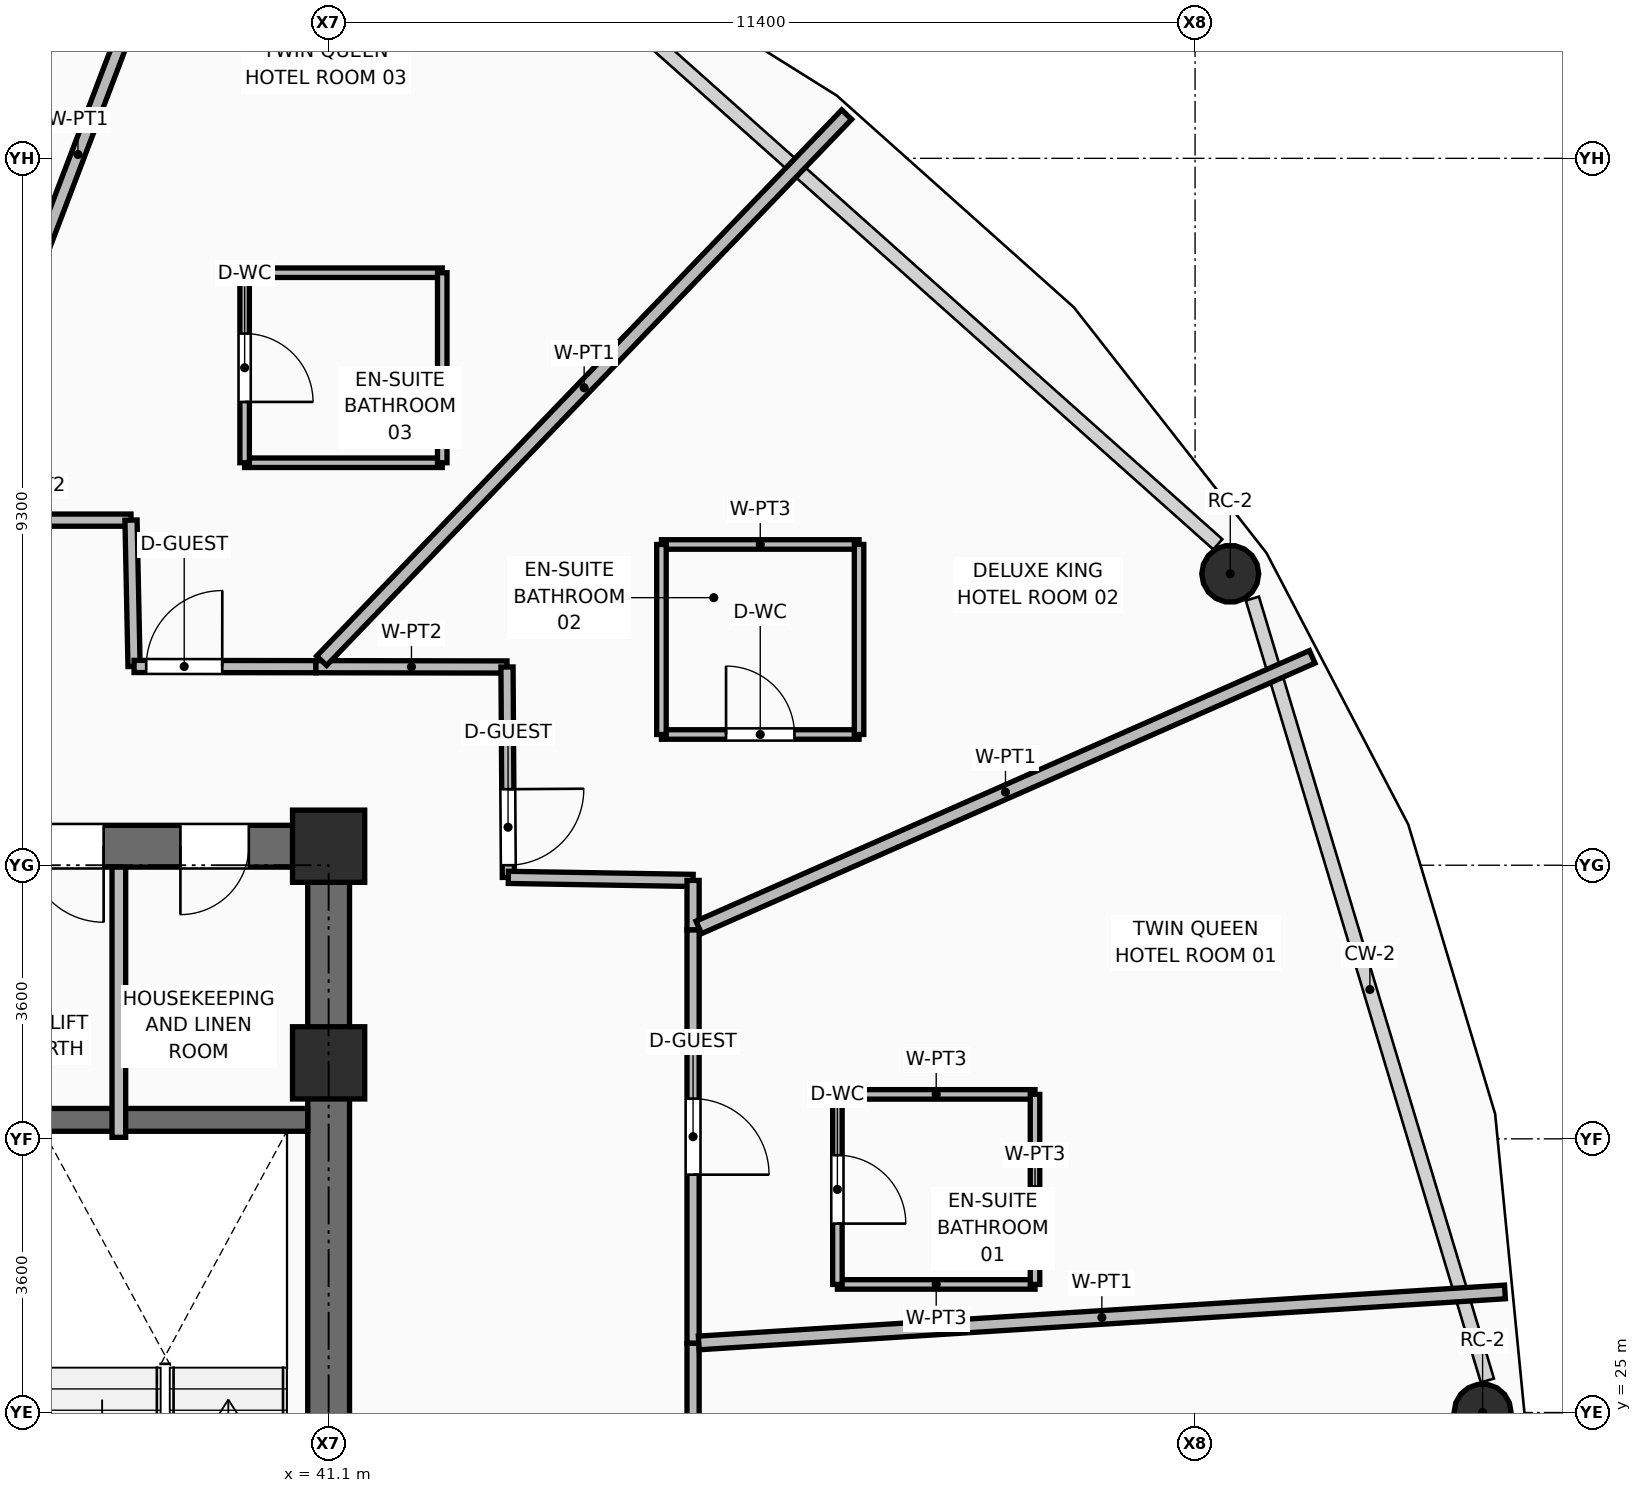
"""IFC4 building model, lengths in metres.
Left out: names, types, materials, properties, quantities, classifications, styles, units other than length and angle.
Written with IfcOpenShell. Run it as: python <this file> out.ifc"""

import sys

from ifc_helpers import new_model, si_unit, direction, frame, frame_2d, origin, origin_2d, place, context, subcontext, project, spatial, rectangle, hollow_circle, extrude, element, fill, save


model = new_model("IFC4")
c1 = context("Model", 3, precision=1e-05, world=origin(), true_north=direction((0.0, 1.0)))
c2 = subcontext(c1, "Body", "Model", "MODEL_VIEW")
j1 = project(units=[si_unit("LENGTHUNIT", "METRE"), si_unit("PLANEANGLEUNIT", "RADIAN")], contexts=[c1])
p1 = place(None, origin())
s1 = spatial("IfcSite", under=j1, at=p1, CompositionType="ELEMENT")
p2 = place(p1, origin())
s2 = spatial("IfcBuilding", under=s1, at=p2, CompositionType="ELEMENT")
p3 = place(p2, frame((0.0, 0.0, 153.45)))
s3 = spatial("IfcBuildingStorey", under=s2, at=p3, CompositionType="ELEMENT", Elevation=153.45)
for number, where, z_axis, x_axis in (
    (1, (41.1, 29.6, 0.0), (0.0, 0.0, 1.0), (1.0, 0.0, 0.0)),
    (2, (41.1, 32.45, 0.0), (0.0, 0.0, 1.0), (1.0, 0.0, 0.0)),
):
    element("IfcColumn", number, at=place(p3, frame(where, z_axis=z_axis, x_axis=x_axis)), inside=s3, PredefinedType="COLUMN", context=c2, shape_type="SweptSolid", body=[
        extrude(rectangle(XDim=0.95, YDim=0.95, at=origin_2d()), origin(), (0.0, 0.0, 1.0), 3.75),
    ])
for number, where, z_axis, x_axis in (
    (3, (56.283, 25.0, 0.0), (0.0, 0.0, 1.0), (1.0, 0.0, 0.0)),
    (4, (52.963, 36.034, 0.0), (0.0, 0.0, 1.0), (1.0, 0.0, 0.0)),
):
    element("IfcColumn", number, at=place(p3, frame(where, z_axis=z_axis, x_axis=x_axis)), inside=s3, PredefinedType="COLUMN", context=c2, shape_type="SweptSolid", body=[
        extrude(hollow_circle(Radius=0.375, WallThickness=0.035, at=origin_2d()), origin(), (0.0, 0.0, 1.0), 3.57),
    ])
p4 = place(p3, frame((21.625, 32.45, 0.0), z_axis=(0.0, 0.0, 1.0), x_axis=(1.0, 0.0, 0.0)))
e5 = element("IfcWall", 5, at=p4, inside=s3, PredefinedType="SHEAR", context=c2, shape_type="SweptSolid", body=[
    extrude(rectangle(XDim=19.75, YDim=0.55, at=frame_2d((9.875, 0.0))), origin(), (0.0, 0.0, 1.0), 3.57),
])
p5 = place(p4, frame((2.125, 0.0, 0.0)))
e6 = element("IfcOpeningElement", 6, at=p5, cuts=e5, PredefinedType="OPENING", context=c2, shape_type="SweptSolid", body=[
    extrude(rectangle(XDim=1.1, YDim=2.1, at=frame_2d((0.55, 1.05))), frame((0.0, 0.285, 0.0), z_axis=(0.0, -1.0, 0.0), x_axis=(1.0, 0.0, 0.0)), (0.0, 0.0, 1.0), 0.57),
])
p6 = place(p4, frame((15.515, 0.0, 0.0)))
e7 = element("IfcOpeningElement", 7, at=p6, cuts=e5, PredefinedType="OPENING", context=c2, shape_type="SweptSolid", body=[
    extrude(rectangle(XDim=1.0, YDim=2.1, at=frame_2d((0.5, 1.05))), frame((0.0, 0.285, 0.0), z_axis=(0.0, -1.0, 0.0), x_axis=(1.0, 0.0, 0.0)), (0.0, 0.0, 1.0), 0.57),
])
p7 = place(p4, frame((17.525, 0.0, 0.0)))
e8 = element("IfcOpeningElement", 8, at=p7, cuts=e5, PredefinedType="OPENING", context=c2, shape_type="SweptSolid", body=[
    extrude(rectangle(XDim=0.9, YDim=2.1, at=frame_2d((0.45, 1.05))), frame((0.0, 0.285, 0.0), z_axis=(0.0, -1.0, 0.0), x_axis=(1.0, 0.0, 0.0)), (0.0, 0.0, 1.0), 0.57),
])
p8 = place(p3, frame((41.1, 18.075, 0.0), z_axis=(0.0, 0.0, 1.0), x_axis=(0.0, 1.0, 0.0)))
e9 = element("IfcWall", 9, at=p8, inside=s3, PredefinedType="SHEAR", context=c2, shape_type="SweptSolid", body=[
    extrude(rectangle(XDim=14.1, YDim=0.55, at=frame_2d((7.05, 0.0))), origin(), (0.0, 0.0, 1.0), 3.57),
])
p9 = place(p8, frame((3.385, 0.0, 0.0)))
e10 = element("IfcOpeningElement", 10, at=p9, cuts=e9, PredefinedType="OPENING", context=c2, shape_type="SweptSolid", body=[
    extrude(rectangle(XDim=1.05, YDim=2.1, at=frame_2d((0.525, 1.05))), frame((0.0, 0.285, 0.0), z_axis=(0.0, -1.0, 0.0), x_axis=(1.0, 0.0, 0.0)), (0.0, 0.0, 1.0), 0.57),
])
p10 = place(p3, frame((37.21, 28.85, 0.0), z_axis=(0.0, 0.0, 1.0), x_axis=(1.0, 0.0, 0.0)))
e11 = element("IfcWall", 11, at=p10, inside=s3, PredefinedType="SHEAR", context=c2, shape_type="SweptSolid", body=[
    extrude(rectangle(XDim=3.615, YDim=0.3, at=frame_2d((1.808, 0.0))), origin(), (0.0, 0.0, 1.0), 3.57),
])
p11 = place(p3, frame((38.34, 28.62, 0.0), z_axis=(0.0, 0.0, 1.0), x_axis=(0.0, 1.0, 0.0)))
e12 = element("IfcWall", 12, at=p11, inside=s3, PredefinedType="PARTITIONING", context=c2, shape_type="SweptSolid", body=[
    extrude(rectangle(XDim=3.555, YDim=0.18, at=frame_2d((1.777, 0.0))), origin(), (0.0, 0.0, 1.0), 3.55),
])
p12 = place(p3, frame((35.971, 36.74, 0.0), z_axis=(0.0, 0.0, 1.0), x_axis=(1.0, 0.0, 0.0)))
e13 = element("IfcWall", 13, at=p12, inside=s3, PredefinedType="PARTITIONING", context=c2, shape_type="SweptSolid", body=[
    extrude(rectangle(XDim=2.529, YDim=0.16, at=frame_2d((1.265, 0.0))), origin(), (0.0, 0.0, 1.0), 3.55),
])
p13 = place(p3, frame((38.5, 36.74, 0.0), z_axis=(0.0, 0.0, 1.0), x_axis=(0.020794488077, -0.999783771255, 0.0)))
e14 = element("IfcWall", 14, at=p13, inside=s3, PredefinedType="PARTITIONING", context=c2, shape_type="SweptSolid", body=[
    extrude(rectangle(XDim=1.926, YDim=0.16, at=frame_2d((0.963, 0.0))), origin(), (0.0, 0.0, 1.0), 3.55),
])
p14 = place(p3, frame((38.54, 34.815, 0.0), z_axis=(0.0, 0.0, 1.0), x_axis=(0.999999250619, -0.001224239034, 0.0)))
e15 = element("IfcWall", 15, at=p14, inside=s3, PredefinedType="PARTITIONING", context=c2, shape_type="SweptSolid", body=[
    extrude(rectangle(XDim=2.393, YDim=0.16, at=frame_2d((1.197, 0.0))), origin(), (0.0, 0.0, 1.0), 3.55),
])
p15 = place(p14, frame((0.16, 0.0, 0.0)))
e16 = element("IfcOpeningElement", 16, at=p15, cuts=e15, PredefinedType="OPENING", context=c2, shape_type="SweptSolid", body=[
    extrude(rectangle(XDim=1.0, YDim=2.1, at=frame_2d((0.5, 1.05))), frame((0.0, 0.09, 0.0), z_axis=(0.0, -1.0, 0.0), x_axis=(1.0, 0.0, 0.0)), (0.0, 0.0, 1.0), 0.18),
])
p16 = place(p3, frame((40.933, 34.812, 0.0), z_axis=(0.0, 0.0, 1.0), x_axis=(0.999998792776, -0.00155384876, 0.0)))
e17 = element("IfcWall", 17, at=p16, inside=s3, PredefinedType="PARTITIONING", context=c2, shape_type="SweptSolid", body=[
    extrude(rectangle(XDim=2.514, YDim=0.16, at=frame_2d((1.257, 0.0))), origin(), (0.0, 0.0, 1.0), 3.006),
])
p17 = place(p3, frame((43.447, 34.808, 0.0), z_axis=(0.0, 0.0, 1.0), x_axis=(0.006526585281, -0.999978701615, 0.0)))
e18 = element("IfcWall", 18, at=p17, inside=s3, PredefinedType="PARTITIONING", context=c2, shape_type="SweptSolid", body=[
    extrude(rectangle(XDim=2.768, YDim=0.16, at=frame_2d((1.384, 0.0))), origin(), (0.0, 0.0, 1.0), 3.006),
])
p18 = place(p17, frame((1.608, 0.0, 0.0)))
e19 = element("IfcOpeningElement", 19, at=p18, cuts=e18, PredefinedType="OPENING", context=c2, shape_type="SweptSolid", body=[
    extrude(rectangle(XDim=1.0, YDim=2.1, at=frame_2d((0.5, 1.05))), frame((0.0, 0.09, 0.0), z_axis=(0.0, -1.0, 0.0), x_axis=(1.0, 0.0, 0.0)), (0.0, 0.0, 1.0), 0.18),
])
p19 = place(p3, frame((43.465, 32.04, 0.0), z_axis=(0.0, 0.0, 1.0), x_axis=(0.999864274557, -0.016475207578, 0.0)))
e20 = element("IfcWall", 20, at=p19, inside=s3, PredefinedType="PARTITIONING", context=c2, shape_type="SweptSolid", body=[
    extrude(rectangle(XDim=2.43, YDim=0.16, at=frame_2d((1.215, 0.0))), origin(), (0.0, 0.0, 1.0), 3.55),
])
p20 = place(p3, frame((45.895, 32.0, 0.0), z_axis=(0.0, 0.0, 1.0), x_axis=(0.0, -1.0, 0.0)))
e21 = element("IfcWall", 21, at=p20, inside=s3, PredefinedType="PARTITIONING", context=c2, shape_type="SweptSolid", body=[
    extrude(rectangle(XDim=0.652, YDim=0.16, at=frame_2d((0.326, 0.0))), origin(), (0.0, 0.0, 1.0), 3.55),
])
p21 = place(p3, frame((45.895, 31.348, 0.0), z_axis=(0.0, 0.0, 1.0), x_axis=(0.0, -1.0, 0.0)))
e22 = element("IfcWall", 22, at=p21, inside=s3, PredefinedType="PARTITIONING", context=c2, shape_type="SweptSolid", body=[
    extrude(rectangle(XDim=5.438, YDim=0.16, at=frame_2d((2.719, 0.0))), origin(), (0.0, 0.0, 1.0), 3.55),
])
p22 = place(p21, frame((2.219, 0.0, 0.0)))
e23 = element("IfcOpeningElement", 23, at=p22, cuts=e22, PredefinedType="OPENING", context=c2, shape_type="SweptSolid", body=[
    extrude(rectangle(XDim=1.0, YDim=2.1, at=frame_2d((0.5, 1.05))), frame((0.0, 0.09, 0.0), z_axis=(0.0, -1.0, 0.0), x_axis=(1.0, 0.0, 0.0)), (0.0, 0.0, 1.0), 0.18),
])
p23 = place(p3, frame((45.895, 25.91, 0.0), z_axis=(0.0, 0.0, 1.0), x_axis=(0.0, -1.0, 0.0)))
e24 = element("IfcWall", 24, at=p23, inside=s3, PredefinedType="PARTITIONING", context=c2, shape_type="SweptSolid", body=[
    extrude(rectangle(XDim=5.139, YDim=0.16, at=frame_2d((2.569, 0.0))), origin(), (0.0, 0.0, 1.0), 3.006),
])
p24 = place(p23, frame((2.069, 0.0, 0.0)))
e25 = element("IfcOpeningElement", 25, at=p24, cuts=e24, PredefinedType="OPENING", context=c2, shape_type="SweptSolid", body=[
    extrude(rectangle(XDim=1.0, YDim=2.1, at=frame_2d((0.5, 1.05))), frame((0.0, 0.09, 0.0), z_axis=(0.0, -1.0, 0.0), x_axis=(1.0, 0.0, 0.0)), (0.0, 0.0, 1.0), 0.18),
])
p25 = place(p3, frame((45.97, 25.915, 0.0), z_axis=(0.0, 0.0, 1.0), x_axis=(0.998005641889, 0.063124787182, 0.0)))
e26 = element("IfcWall", 26, at=p25, inside=s3, PredefinedType="PARTITIONING", context=c2, shape_type="SweptSolid", body=[
    extrude(rectangle(XDim=10.628, YDim=0.18, at=frame_2d((5.314, 0.0))), origin(), (0.0, 0.0, 1.0), 2.852),
])
p26 = place(p3, frame((45.97, 31.382, 0.0), z_axis=(0.0, 0.0, 1.0), x_axis=(0.914998050902, 0.403458259112, 0.0)))
e27 = element("IfcWall", 27, at=p26, inside=s3, PredefinedType="PARTITIONING", context=c2, shape_type="SweptSolid", body=[
    extrude(rectangle(XDim=8.821, YDim=0.18, at=frame_2d((4.41, 0.0))), origin(), (0.0, 0.0, 1.0), 2.852),
])
p27 = place(p3, frame((41.008, 34.89, 0.0), z_axis=(0.0, 0.0, 1.0), x_axis=(0.693069554284, 0.720870718593, 0.0)))
e28 = element("IfcWall", 28, at=p27, inside=s3, PredefinedType="PARTITIONING", context=c2, shape_type="SweptSolid", body=[
    extrude(rectangle(XDim=9.967, YDim=0.18, at=frame_2d((4.984, 0.0))), origin(), (0.0, 0.0, 1.0), 2.852),
])
p28 = place(p3, frame((35.999, 36.815, 0.0), z_axis=(0.0, 0.0, 1.0), x_axis=(0.355905167446, 0.934522076671, 0.0)))
e29 = element("IfcWall", 29, at=p28, inside=s3, PredefinedType="PARTITIONING", context=c2, shape_type="SweptSolid", body=[
    extrude(rectangle(XDim=10.135, YDim=0.18, at=frame_2d((5.067, 0.0))), origin(), (0.0, 0.0, 1.0), 2.852),
])
for number, where, z_axis, x_axis in (
    (30, (47.794, 26.685, 0.0), (0.0, 0.0, 1.0), (1.0, 0.0, 0.0)),
    (31, (47.794, 29.185, 0.0), (0.0, 0.0, 1.0), (1.0, 0.0, 0.0)),
):
    element("IfcWall", number, at=place(p3, frame(where, z_axis=z_axis, x_axis=x_axis)), inside=s3, PredefinedType="PARTITIONING", context=c2, shape_type="SweptSolid", body=[
        extrude(rectangle(XDim=2.6, YDim=0.125, at=frame_2d((1.3, 0.0))), origin(), (0.0, 0.0, 1.0), 3.55),
    ])
p29 = place(p3, frame((47.794, 26.685, 0.0), z_axis=(0.0, 0.0, 1.0), x_axis=(0.0, 1.0, 0.0)))
e32 = element("IfcWall", 32, at=p29, inside=s3, PredefinedType="PARTITIONING", context=c2, shape_type="SweptSolid", body=[
    extrude(rectangle(XDim=2.5, YDim=0.125, at=frame_2d((1.25, 0.0))), origin(), (0.0, 0.0, 1.0), 3.55),
])
p30 = place(p29, frame((0.8, 0.0, 0.0)))
e33 = element("IfcOpeningElement", 33, at=p30, cuts=e32, PredefinedType="OPENING", context=c2, shape_type="SweptSolid", body=[
    extrude(rectangle(XDim=0.9, YDim=2.1, at=frame_2d((0.45, 1.05))), frame((0.0, 0.073, 0.0), z_axis=(0.0, -1.0, 0.0), x_axis=(1.0, 0.0, 0.0)), (0.0, 0.0, 1.0), 0.145),
])
p31 = place(p3, frame((50.394, 26.685, 0.0), z_axis=(0.0, 0.0, 1.0), x_axis=(0.0, 1.0, 0.0)))
e34 = element("IfcWall", 34, at=p31, inside=s3, PredefinedType="PARTITIONING", context=c2, shape_type="SweptSolid", body=[
    extrude(rectangle(XDim=2.5, YDim=0.125, at=frame_2d((1.25, 0.0))), origin(), (0.0, 0.0, 1.0), 3.55),
])
p32 = place(p3, frame((45.479, 33.92, 0.0), z_axis=(0.0, 0.0, 1.0), x_axis=(1.0, 0.0, 0.0)))
e35 = element("IfcWall", 35, at=p32, inside=s3, PredefinedType="PARTITIONING", context=c2, shape_type="SweptSolid", body=[
    extrude(rectangle(XDim=2.6, YDim=0.125, at=frame_2d((1.3, 0.0))), origin(), (0.0, 0.0, 1.0), 3.006),
])
p33 = place(p32, frame((0.85, 0.0, 0.0)))
e36 = element("IfcOpeningElement", 36, at=p33, cuts=e35, PredefinedType="OPENING", context=c2, shape_type="SweptSolid", body=[
    extrude(rectangle(XDim=0.9, YDim=2.1, at=frame_2d((0.45, 1.05))), frame((0.0, 0.073, 0.0), z_axis=(0.0, -1.0, 0.0), x_axis=(1.0, 0.0, 0.0)), (0.0, 0.0, 1.0), 0.145),
])
p34 = place(p3, frame((45.479, 36.42, 0.0), z_axis=(0.0, 0.0, 1.0), x_axis=(1.0, 0.0, 0.0)))
e37 = element("IfcWall", 37, at=p34, inside=s3, PredefinedType="PARTITIONING", context=c2, shape_type="SweptSolid", body=[
    extrude(rectangle(XDim=2.6, YDim=0.125, at=frame_2d((1.3, 0.0))), origin(), (0.0, 0.0, 1.0), 3.55),
])
for number, where, z_axis, x_axis in (
    (38, (45.479, 33.92, 0.0), (0.0, 0.0, 1.0), (0.0, 1.0, 0.0)),
    (39, (48.079, 33.92, 0.0), (0.0, 0.0, 1.0), (0.0, 1.0, 0.0)),
):
    element("IfcWall", number, at=place(p3, frame(where, z_axis=z_axis, x_axis=x_axis)), inside=s3, PredefinedType="PARTITIONING", context=c2, shape_type="SweptSolid", body=[
        extrude(rectangle(XDim=2.5, YDim=0.125, at=frame_2d((1.25, 0.0))), origin(), (0.0, 0.0, 1.0), 3.006),
    ])
p35 = place(p3, frame((39.995, 37.495, 0.0), z_axis=(0.0, 0.0, 1.0), x_axis=(1.0, 0.0, 0.0)))
e40 = element("IfcWall", 40, at=p35, inside=s3, PredefinedType="PARTITIONING", context=c2, shape_type="SweptSolid", body=[
    extrude(rectangle(XDim=2.6, YDim=0.125, at=frame_2d((1.3, 0.0))), origin(), (0.0, 0.0, 1.0), 3.006),
])
p36 = place(p3, frame((39.995, 39.995, 0.0), z_axis=(0.0, 0.0, 1.0), x_axis=(1.0, 0.0, 0.0)))
e41 = element("IfcWall", 41, at=p36, inside=s3, PredefinedType="PARTITIONING", context=c2, shape_type="SweptSolid", body=[
    extrude(rectangle(XDim=2.6, YDim=0.125, at=frame_2d((1.3, 0.0))), origin(), (0.0, 0.0, 1.0), 3.55),
])
p37 = place(p3, frame((39.995, 37.495, 0.0), z_axis=(0.0, 0.0, 1.0), x_axis=(0.0, 1.0, 0.0)))
e42 = element("IfcWall", 42, at=p37, inside=s3, PredefinedType="PARTITIONING", context=c2, shape_type="SweptSolid", body=[
    extrude(rectangle(XDim=2.5, YDim=0.125, at=frame_2d((1.25, 0.0))), origin(), (0.0, 0.0, 1.0), 3.55),
])
p38 = place(p37, frame((0.8, 0.0, 0.0)))
e43 = element("IfcOpeningElement", 43, at=p38, cuts=e42, PredefinedType="OPENING", context=c2, shape_type="SweptSolid", body=[
    extrude(rectangle(XDim=0.9, YDim=2.1, at=frame_2d((0.45, 1.05))), frame((0.0, 0.073, 0.0), z_axis=(0.0, -1.0, 0.0), x_axis=(1.0, 0.0, 0.0)), (0.0, 0.0, 1.0), 0.145),
])
p39 = place(p3, frame((42.595, 37.495, 0.0), z_axis=(0.0, 0.0, 1.0), x_axis=(0.0, 1.0, 0.0)))
e44 = element("IfcWall", 44, at=p39, inside=s3, PredefinedType="PARTITIONING", context=c2, shape_type="SweptSolid", body=[
    extrude(rectangle(XDim=2.5, YDim=0.125, at=frame_2d((1.25, 0.0))), origin(), (0.0, 0.0, 1.0), 3.006),
])
p40 = place(p6, frame((1.0, 0.0, 0.0), z_axis=(0.0, 0.0, 1.0), x_axis=(-1.0, 0.0, 0.0)))
e45 = element("IfcDoor", 45, at=p40, inside=s3, OperationType="SINGLE_SWING_LEFT", PredefinedType="DOOR", context=c2, shape_type="SweptSolid", body=[
    extrude(rectangle(XDim=1.0, YDim=2.1, at=frame_2d((0.5, 1.05))), frame((0.0, 0.025, 0.0), z_axis=(0.0, -1.0, 0.0), x_axis=(1.0, 0.0, 0.0)), (0.0, 0.0, 1.0), 0.05),
])
fill(e7, e45)
p41 = place(p7, frame((0.9, 0.0, 0.0), z_axis=(0.0, 0.0, 1.0), x_axis=(-1.0, 0.0, 0.0)))
e46 = element("IfcDoor", 46, at=p41, inside=s3, OperationType="SINGLE_SWING_RIGHT", PredefinedType="DOOR", context=c2, shape_type="SweptSolid", body=[
    extrude(rectangle(XDim=0.9, YDim=2.1, at=frame_2d((0.45, 1.05))), frame((0.0, 0.025, 0.0), z_axis=(0.0, -1.0, 0.0), x_axis=(1.0, 0.0, 0.0)), (0.0, 0.0, 1.0), 0.05),
])
fill(e8, e46)
p42 = place(p30, frame((0.9, 0.0, 0.0), z_axis=(0.0, 0.0, 1.0), x_axis=(-1.0, 0.0, 0.0)))
e47 = element("IfcDoor", 47, at=p42, inside=s3, OperationType="SINGLE_SWING_RIGHT", PredefinedType="DOOR", context=c2, shape_type="SweptSolid", body=[
    extrude(rectangle(XDim=0.9, YDim=2.1, at=frame_2d((0.45, 1.05))), frame((0.0, 0.025, 0.0), z_axis=(0.0, -1.0, 0.0), x_axis=(1.0, 0.0, 0.0)), (0.0, 0.0, 1.0), 0.05),
])
fill(e33, e47)
p43 = place(p22, origin())
e48 = element("IfcDoor", 48, at=p43, inside=s3, OperationType="SINGLE_SWING_RIGHT", PredefinedType="DOOR", context=c2, shape_type="SweptSolid", body=[
    extrude(rectangle(XDim=1.0, YDim=2.1, at=frame_2d((0.5, 1.05))), frame((0.0, 0.025, 0.0), z_axis=(0.0, -1.0, 0.0), x_axis=(1.0, 0.0, 0.0)), (0.0, 0.0, 1.0), 0.05),
])
fill(e23, e48)
p44 = place(p33, origin())
e49 = element("IfcDoor", 49, at=p44, inside=s3, OperationType="SINGLE_SWING_LEFT", PredefinedType="DOOR", context=c2, shape_type="SweptSolid", body=[
    extrude(rectangle(XDim=0.9, YDim=2.1, at=frame_2d((0.45, 1.05))), frame((0.0, 0.025, 0.0), z_axis=(0.0, -1.0, 0.0), x_axis=(1.0, 0.0, 0.0)), (0.0, 0.0, 1.0), 0.05),
])
fill(e36, e49)
p45 = place(p18, origin())
e50 = element("IfcDoor", 50, at=p45, inside=s3, OperationType="SINGLE_SWING_LEFT", PredefinedType="DOOR", context=c2, shape_type="SweptSolid", body=[
    extrude(rectangle(XDim=1.0, YDim=2.1, at=frame_2d((0.5, 1.05))), frame((0.0, 0.025, 0.0), z_axis=(0.0, -1.0, 0.0), x_axis=(1.0, 0.0, 0.0)), (0.0, 0.0, 1.0), 0.05),
])
fill(e19, e50)
p46 = place(p38, frame((0.9, 0.0, 0.0), z_axis=(0.0, 0.0, 1.0), x_axis=(-1.0, 0.0, 0.0)))
e51 = element("IfcDoor", 51, at=p46, inside=s3, OperationType="SINGLE_SWING_RIGHT", PredefinedType="DOOR", context=c2, shape_type="SweptSolid", body=[
    extrude(rectangle(XDim=0.9, YDim=2.1, at=frame_2d((0.45, 1.05))), frame((0.0, 0.025, 0.0), z_axis=(0.0, -1.0, 0.0), x_axis=(1.0, 0.0, 0.0)), (0.0, 0.0, 1.0), 0.05),
])
fill(e43, e51)
p47 = place(p15, origin())
e52 = element("IfcDoor", 52, at=p47, inside=s3, OperationType="SINGLE_SWING_RIGHT", PredefinedType="DOOR", context=c2, shape_type="SweptSolid", body=[
    extrude(rectangle(XDim=1.0, YDim=2.1, at=frame_2d((0.5, 1.05))), frame((0.0, 0.025, 0.0), z_axis=(0.0, -1.0, 0.0), x_axis=(1.0, 0.0, 0.0)), (0.0, 0.0, 1.0), 0.05),
])
fill(e16, e52)
save(model, sys.argv[1])
